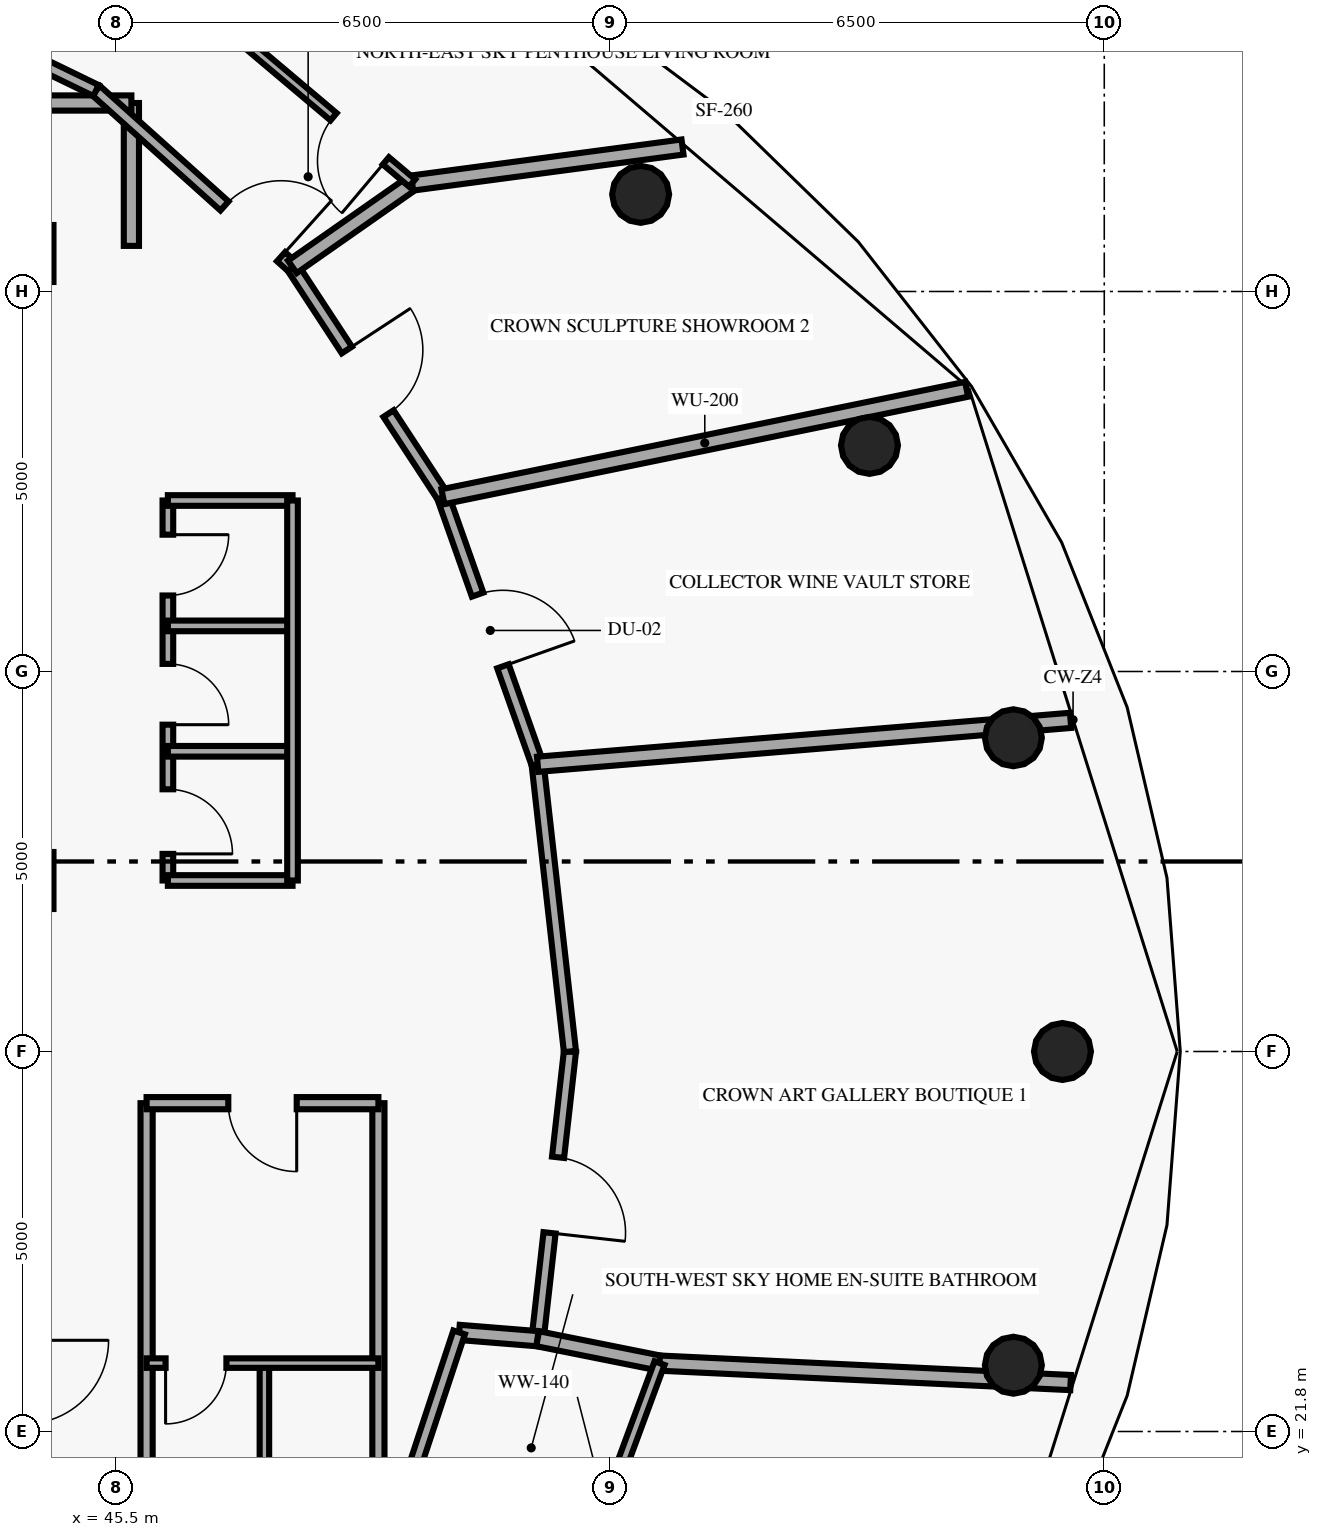
"""IFC4 building model, lengths in metres.
Left out: names, types, materials, properties, quantities, classifications, styles, units other than length and angle.
Written with IfcOpenShell. Run it as: python <this file> out.ifc"""

import sys

from ifc_helpers import new_model, si_unit, direction, frame, frame_2d, origin, origin_2d, place, context, subcontext, project, spatial, rectangle, circle, extrude, element, fill, save


model = new_model("IFC4")
c1 = context("Model", 3, precision=1e-05, world=origin(), true_north=direction((0.0, 1.0)))
c2 = subcontext(c1, "Body", "Model", "MODEL_VIEW")
j1 = project(units=[si_unit("LENGTHUNIT", "METRE"), si_unit("PLANEANGLEUNIT", "RADIAN")], contexts=[c1])
p1 = place(None, origin())
s1 = spatial("IfcSite", under=j1, at=p1, CompositionType="ELEMENT")
p2 = place(p1, origin())
s2 = spatial("IfcBuilding", under=s1, at=p2, CompositionType="ELEMENT")
p3 = place(p2, frame((0.0, 0.0, 255.6)))
s3 = spatial("IfcBuildingStorey", under=s2, at=p3, CompositionType="ELEMENT", Elevation=255.6)
for number, where, z_axis, x_axis in (
    (1, (44.3, 29.05, 0.0), (0.0, 0.0, 1.0), (1.0, 0.0, 0.0)),
    (2, (44.3, 37.3, 0.0), (0.0, 0.0, 1.0), (1.0, 0.0, 0.0)),
):
    element("IfcColumn", number, at=place(p3, frame(where, z_axis=z_axis, x_axis=x_axis)), inside=s3, PredefinedType="PILASTER", context=c2, shape_type="SweptSolid", body=[
        extrude(rectangle(XDim=0.75, YDim=0.75, at=origin_2d()), origin(), (0.0, 0.0, 1.0), 3.54),
    ])
for number, where, z_axis, x_axis in (
    (3, (57.95, 26.8, 0.0), (0.0, 0.0, 1.0), (1.0, 0.0, 0.0)),
    (4, (57.304, 30.928, 0.0), (0.0, 0.0, 1.0), (1.0, 0.0, 0.0)),
    (5, (55.411, 34.775, 0.0), (0.0, 0.0, 1.0), (1.0, 0.0, 0.0)),
    (6, (52.4, 38.078, 0.0), (0.0, 0.0, 1.0), (1.0, 0.0, 0.0)),
    (7, (57.304, 22.672, 0.0), (0.0, 0.0, 1.0), (1.0, 0.0, 0.0)),
):
    element("IfcColumn", number, at=place(p3, frame(where, z_axis=z_axis, x_axis=x_axis)), inside=s3, PredefinedType="COLUMN", context=c2, shape_type="SweptSolid", body=[
        extrude(circle(Radius=0.375, at=origin_2d()), origin(), (0.0, 0.0, 1.0), 3.54),
    ])
p4 = place(p3, frame((45.7, 37.4, 0.0), z_axis=(0.0, 0.0, 1.0), x_axis=(0.0, 1.0, 0.0)))
e8 = element("IfcWall", 8, at=p4, inside=s3, PredefinedType="SOLIDWALL", context=c2, shape_type="SweptSolid", body=[
    extrude(rectangle(XDim=1.88, YDim=0.2, at=frame_2d((0.94, 0.0))), origin(), (0.0, 0.0, 1.0), 3.54),
])
p5 = place(p3, frame((45.7, 39.28, 0.0), z_axis=(0.0, 0.0, 1.0), x_axis=(-1.0, 0.0, 0.0)))
e9 = element("IfcWall", 9, at=p5, inside=s3, PredefinedType="SOLIDWALL", context=c2, shape_type="SweptSolid", body=[
    extrude(rectangle(XDim=6.6, YDim=0.2, at=frame_2d((3.3, 0.0))), origin(), (0.0, 0.0, 1.0), 3.54),
])
p6 = place(p5, frame((4.35, 0.0, 0.0)))
e10 = element("IfcOpeningElement", 10, at=p6, cuts=e9, PredefinedType="OPENING", context=c2, shape_type="SweptSolid", body=[
    extrude(rectangle(XDim=1.6, YDim=2.2, at=frame_2d((0.8, 1.1))), frame((0.0, 0.11, 0.0), z_axis=(0.0, -1.0, 0.0), x_axis=(1.0, 0.0, 0.0)), (0.0, 0.0, 1.0), 0.22),
])
for number, where, z_axis, x_axis in (
    (11, (48.95, 19.05, 0.0), (0.0, 0.0, 1.0), (0.0, 1.0, 0.0)),
    (12, (45.9, 19.05, 0.0), (0.0, 0.0, 1.0), (0.0, 1.0, 0.0)),
):
    element("IfcWall", number, at=place(p3, frame(where, z_axis=z_axis, x_axis=x_axis)), inside=s3, PredefinedType="PARTITIONING", context=c2, shape_type="SweptSolid", body=[
        extrude(rectangle(XDim=7.07, YDim=0.16, at=frame_2d((3.535, 0.0))), origin(), (0.0, 0.0, 1.0), 3.54),
    ])
p7 = place(p3, frame((47.45, 22.7, 0.0), z_axis=(0.0, 0.0, 1.0), x_axis=(0.0, -1.0, 0.0)))
e13 = element("IfcWall", 13, at=p7, inside=s3, PredefinedType="PARTITIONING", context=c2, shape_type="SweptSolid", body=[
    extrude(rectangle(XDim=3.65, YDim=0.125, at=frame_2d((1.825, 0.0))), origin(), (0.0, 0.0, 1.0), 3.54),
])
p8 = place(p7, frame((1.425, 0.0, 0.0)))
e14 = element("IfcOpeningElement", 14, at=p8, cuts=e13, PredefinedType="OPENING", context=c2, shape_type="SweptSolid", body=[
    extrude(rectangle(XDim=0.8, YDim=2.05, at=frame_2d((0.4, 1.025))), frame((0.0, 0.073, 0.0), z_axis=(0.0, -1.0, 0.0), x_axis=(1.0, 0.0, 0.0)), (0.0, 0.0, 1.0), 0.145),
])
p9 = place(p3, frame((48.95, 22.7, 0.0), z_axis=(0.0, 0.0, 1.0), x_axis=(-1.0, 0.0, 0.0)))
e15 = element("IfcWall", 15, at=p9, inside=s3, PredefinedType="PARTITIONING", context=c2, shape_type="SweptSolid", body=[
    extrude(rectangle(XDim=3.05, YDim=0.125, at=frame_2d((1.525, 0.0))), origin(), (0.0, 0.0, 1.0), 3.54),
])
p10 = place(p9, frame((2.0, 0.0, 0.0)))
e16 = element("IfcOpeningElement", 16, at=p10, cuts=e15, PredefinedType="OPENING", context=c2, shape_type="SweptSolid", body=[
    extrude(rectangle(XDim=0.8, YDim=2.05, at=frame_2d((0.4, 1.025))), frame((0.0, 0.073, 0.0), z_axis=(0.0, -1.0, 0.0), x_axis=(1.0, 0.0, 0.0)), (0.0, 0.0, 1.0), 0.145),
])
p11 = place(p3, frame((48.95, 26.12, 0.0), z_axis=(0.0, 0.0, 1.0), x_axis=(-1.0, 0.0, 0.0)))
e17 = element("IfcWall", 17, at=p11, inside=s3, PredefinedType="PARTITIONING", context=c2, shape_type="SweptSolid", body=[
    extrude(rectangle(XDim=3.05, YDim=0.16, at=frame_2d((1.525, 0.0))), origin(), (0.0, 0.0, 1.0), 3.54),
])
p12 = place(p11, frame((1.075, 0.0, 0.0)))
e18 = element("IfcOpeningElement", 18, at=p12, cuts=e17, PredefinedType="OPENING", context=c2, shape_type="SweptSolid", body=[
    extrude(rectangle(XDim=0.9, YDim=2.1, at=frame_2d((0.45, 1.05))), frame((0.0, 0.09, 0.0), z_axis=(0.0, -1.0, 0.0), x_axis=(1.0, 0.0, 0.0)), (0.0, 0.0, 1.0), 0.18),
])
p13 = place(p3, frame((46.18, 34.05, 0.0), z_axis=(0.0, 0.0, 1.0), x_axis=(0.0, -1.0, 0.0)))
e19 = element("IfcWall", 19, at=p13, inside=s3, PredefinedType="PARTITIONING", context=c2, shape_type="SweptSolid", body=[
    extrude(rectangle(XDim=5.0, YDim=0.14, at=frame_2d((2.5, 0.0))), origin(), (0.0, 0.0, 1.0), 3.54),
])
p14 = place(p13, frame((3.8, 0.0, 0.0)))
e20 = element("IfcOpeningElement", 20, at=p14, cuts=e19, PredefinedType="OPENING", context=c2, shape_type="SweptSolid", body=[
    extrude(rectangle(XDim=0.85, YDim=2.1, at=frame_2d((0.425, 1.05))), frame((0.0, 0.08, 0.0), z_axis=(0.0, -1.0, 0.0), x_axis=(1.0, 0.0, 0.0)), (0.0, 0.0, 1.0), 0.16),
])
p15 = place(p13, frame((2.15, 0.0, 0.0)))
e21 = element("IfcOpeningElement", 21, at=p15, cuts=e19, PredefinedType="OPENING", context=c2, shape_type="SweptSolid", body=[
    extrude(rectangle(XDim=0.8, YDim=2.05, at=frame_2d((0.4, 1.025))), frame((0.0, 0.08, 0.0), z_axis=(0.0, -1.0, 0.0), x_axis=(1.0, 0.0, 0.0)), (0.0, 0.0, 1.0), 0.16),
])
p16 = place(p13, frame((0.45, 0.0, 0.0)))
e22 = element("IfcOpeningElement", 22, at=p16, cuts=e19, PredefinedType="OPENING", context=c2, shape_type="SweptSolid", body=[
    extrude(rectangle(XDim=0.8, YDim=2.05, at=frame_2d((0.4, 1.025))), frame((0.0, 0.08, 0.0), z_axis=(0.0, -1.0, 0.0), x_axis=(1.0, 0.0, 0.0)), (0.0, 0.0, 1.0), 0.16),
])
for number, where, z_axis, x_axis in (
    (23, (46.18, 29.05, 0.0), (0.0, 0.0, 1.0), (1.0, 0.0, 0.0)),
    (24, (46.18, 30.75, 0.0), (0.0, 0.0, 1.0), (1.0, 0.0, 0.0)),
    (25, (46.18, 32.4, 0.0), (0.0, 0.0, 1.0), (1.0, 0.0, 0.0)),
    (26, (46.18, 34.05, 0.0), (0.0, 0.0, 1.0), (1.0, 0.0, 0.0)),
):
    element("IfcWall", number, at=place(p3, frame(where, z_axis=z_axis, x_axis=x_axis)), inside=s3, PredefinedType="PARTITIONING", context=c2, shape_type="SweptSolid", body=[
        extrude(rectangle(XDim=1.64, YDim=0.14, at=frame_2d((0.82, 0.0))), origin(), (0.0, 0.0, 1.0), 3.54),
    ])
p17 = place(p3, frame((47.82, 29.05, 0.0), z_axis=(0.0, 0.0, 1.0), x_axis=(0.0, 1.0, 0.0)))
e27 = element("IfcWall", 27, at=p17, inside=s3, PredefinedType="PARTITIONING", context=c2, shape_type="SweptSolid", body=[
    extrude(rectangle(XDim=5.0, YDim=0.14, at=frame_2d((2.5, 0.0))), origin(), (0.0, 0.0, 1.0), 3.54),
])
p18 = place(p3, frame((51.47, 26.8, 0.0), z_axis=(0.0, 0.0, 1.0), x_axis=(-0.111770206893, -0.993734079546, 0.0)))
e28 = element("IfcWall", 28, at=p18, inside=s3, PredefinedType="PARTITIONING", context=c2, shape_type="SweptSolid", body=[
    extrude(rectangle(XDim=3.803, YDim=0.16, at=frame_2d((1.901, 0.0))), origin(), (0.0, 0.0, 1.0), 3.54),
])
p19 = place(p18, frame((1.401, 0.0, 0.0)))
e29 = element("IfcOpeningElement", 29, at=p19, cuts=e28, PredefinedType="OPENING", context=c2, shape_type="SweptSolid", body=[
    extrude(rectangle(XDim=1.0, YDim=2.15, at=frame_2d((0.5, 1.075))), frame((0.0, 0.09, 0.0), z_axis=(0.0, -1.0, 0.0), x_axis=(1.0, 0.0, 0.0)), (0.0, 0.0, 1.0), 0.18),
])
p20 = place(p3, frame((51.47, 26.8, 0.0), z_axis=(0.0, 0.0, 1.0), x_axis=(-0.111770206893, 0.993734079546, 0.0)))
e30 = element("IfcWall", 30, at=p20, inside=s3, PredefinedType="PARTITIONING", context=c2, shape_type="SweptSolid", body=[
    extrude(rectangle(XDim=3.803, YDim=0.16, at=frame_2d((1.901, 0.0))), origin(), (0.0, 0.0, 1.0), 3.54),
])
p21 = place(p3, frame((49.799, 34.1, 0.0), z_axis=(0.0, 0.0, 1.0), x_axis=(0.333568819216, -0.942725751662, 0.0)))
e31 = element("IfcWall", 31, at=p21, inside=s3, PredefinedType="PARTITIONING", context=c2, shape_type="SweptSolid", body=[
    extrude(rectangle(XDim=3.735, YDim=0.16, at=frame_2d((1.867, 0.0))), origin(), (0.0, 0.0, 1.0), 3.54),
])
p22 = place(p21, frame((1.367, 0.0, 0.0)))
e32 = element("IfcOpeningElement", 32, at=p22, cuts=e31, PredefinedType="OPENING", context=c2, shape_type="SweptSolid", body=[
    extrude(rectangle(XDim=1.0, YDim=2.15, at=frame_2d((0.5, 1.075))), frame((0.0, 0.09, 0.0), z_axis=(0.0, -1.0, 0.0), x_axis=(1.0, 0.0, 0.0)), (0.0, 0.0, 1.0), 0.18),
])
p23 = place(p3, frame((47.818, 37.124, 0.0), z_axis=(0.0, 0.0, 1.0), x_axis=(0.547980633713, -0.836491019124, 0.0)))
e33 = element("IfcWall", 33, at=p23, inside=s3, PredefinedType="PARTITIONING", context=c2, shape_type="SweptSolid", body=[
    extrude(rectangle(XDim=3.615, YDim=0.16, at=frame_2d((1.808, 0.0))), origin(), (0.0, 0.0, 1.0), 3.54),
])
p24 = place(p23, frame((1.308, 0.0, 0.0)))
e34 = element("IfcOpeningElement", 34, at=p24, cuts=e33, PredefinedType="OPENING", context=c2, shape_type="SweptSolid", body=[
    extrude(rectangle(XDim=1.0, YDim=2.15, at=frame_2d((0.5, 1.075))), frame((0.0, 0.09, 0.0), z_axis=(0.0, -1.0, 0.0), x_axis=(1.0, 0.0, 0.0)), (0.0, 0.0, 1.0), 0.18),
])
p25 = place(p3, frame((45.235, 39.444, 0.0), z_axis=(0.0, 0.0, 1.0), x_axis=(0.743958104357, -0.668226263299, 0.0)))
e35 = element("IfcWall", 35, at=p25, inside=s3, PredefinedType="PARTITIONING", context=c2, shape_type="SweptSolid", body=[
    extrude(rectangle(XDim=3.472, YDim=0.16, at=frame_2d((1.736, 0.0))), origin(), (0.0, 0.0, 1.0), 3.54),
])
p26 = place(p25, frame((2.272, 0.0, 0.0)))
e36 = element("IfcOpeningElement", 36, at=p26, cuts=e35, PredefinedType="OPENING", context=c2, shape_type="SweptSolid", body=[
    extrude(rectangle(XDim=1.0, YDim=2.15, at=frame_2d((0.5, 1.075))), frame((0.0, 0.09, 0.0), z_axis=(0.0, -1.0, 0.0), x_axis=(1.0, 0.0, 0.0)), (0.0, 0.0, 1.0), 0.18),
])
p27 = place(p3, frame((45.235, 39.444, 0.0), z_axis=(0.0, 0.0, 1.0), x_axis=(-0.899751550897, 0.436402505329, 0.0)))
e37 = element("IfcWall", 37, at=p27, inside=s3, PredefinedType="PARTITIONING", context=c2, shape_type="SweptSolid", body=[
    extrude(rectangle(XDim=3.343, YDim=0.16, at=frame_2d((1.672, 0.0))), origin(), (0.0, 0.0, 1.0), 3.54),
])
p28 = place(p3, frame((50.012, 23.104, 0.0), z_axis=(0.0, 0.0, 1.0), x_axis=(0.996786749309, -0.080101038706, 0.0)))
e38 = element("IfcWall", 38, at=p28, inside=s3, PredefinedType="PARTITIONING", context=c2, shape_type="SweptSolid", body=[
    extrude(rectangle(XDim=1.036, YDim=0.2, at=frame_2d((0.518, 0.0))), origin(), (0.0, 0.0, 1.0), 3.54),
])
p29 = place(p3, frame((51.045, 23.021, 0.0), z_axis=(0.0, 0.0, 1.0), x_axis=(0.980551963868, -0.196259639648, 0.0)))
e39 = element("IfcWall", 39, at=p29, inside=s3, PredefinedType="PARTITIONING", context=c2, shape_type="SweptSolid", body=[
    extrude(rectangle(XDim=1.636, YDim=0.2, at=frame_2d((0.818, 0.0))), origin(), (0.0, 0.0, 1.0), 3.54),
])
p30 = place(p3, frame((52.649, 22.7, 0.0), z_axis=(0.0, 0.0, 1.0), x_axis=(0.998882680054, -0.047258771554, 0.0)))
e40 = element("IfcWall", 40, at=p30, inside=s3, PredefinedType="PARTITIONING", context=c2, shape_type="SweptSolid", body=[
    extrude(rectangle(XDim=5.414, YDim=0.2, at=frame_2d((2.707, 0.0))), origin(), (0.0, 0.0, 1.0), 3.54),
])
p31 = place(p3, frame((51.045, 30.579, 0.0), z_axis=(0.0, 0.0, 1.0), x_axis=(0.996622662383, 0.082117408774, 0.0)))
e41 = element("IfcWall", 41, at=p31, inside=s3, PredefinedType="PARTITIONING", context=c2, shape_type="SweptSolid", body=[
    extrude(rectangle(XDim=6.27, YDim=0.2, at=frame_2d((3.135, 0.0))), origin(), (0.0, 0.0, 1.0), 3.54),
])
p32 = place(p3, frame((57.294, 31.094, 0.0), z_axis=(0.0, 0.0, 1.0), x_axis=(0.996609247306, 0.082280059458, 0.0)))
e42 = element("IfcWall", 42, at=p32, inside=s3, PredefinedType="PARTITIONING", context=c2, shape_type="SweptSolid", body=[
    extrude(rectangle(XDim=0.766, YDim=0.2, at=frame_2d((0.383, 0.0))), origin(), (0.0, 0.0, 1.0), 2.925),
])
p33 = place(p3, frame((49.799, 34.1, 0.0), z_axis=(0.0, 0.0, 1.0), x_axis=(0.97961583885, 0.200880084314, 0.0)))
e43 = element("IfcWall", 43, at=p33, inside=s3, PredefinedType="PARTITIONING", context=c2, shape_type="SweptSolid", body=[
    extrude(rectangle(XDim=7.033, YDim=0.2, at=frame_2d((3.517, 0.0))), origin(), (0.0, 0.0, 1.0), 3.54),
])
p34 = place(p3, frame((47.818, 37.124, 0.0), z_axis=(0.0, 0.0, 1.0), x_axis=(0.819261732585, 0.573419753341, 0.0)))
e44 = element("IfcWall", 44, at=p34, inside=s3, PredefinedType="PARTITIONING", context=c2, shape_type="SweptSolid", body=[
    extrude(rectangle(XDim=1.924, YDim=0.2, at=frame_2d((0.962, 0.0))), origin(), (0.0, 0.0, 1.0), 3.54),
])
p35 = place(p3, frame((49.394, 38.227, 0.0), z_axis=(0.0, 0.0, 1.0), x_axis=(0.991241562349, 0.13206121714, 0.0)))
e45 = element("IfcWall", 45, at=p35, inside=s3, PredefinedType="PARTITIONING", context=c2, shape_type="SweptSolid", body=[
    extrude(rectangle(XDim=3.588, YDim=0.2, at=frame_2d((1.794, 0.0))), origin(), (0.0, 0.0, 1.0), 3.54),
])
p36 = place(p3, frame((46.35, 40.795, 0.0), z_axis=(0.0, 0.0, 1.0), x_axis=(0.764348134159, -0.644803791713, 0.0)))
e46 = element("IfcWall", 46, at=p36, inside=s3, PredefinedType="PARTITIONING", context=c2, shape_type="SweptSolid", body=[
    extrude(rectangle(XDim=3.982, YDim=0.125, at=frame_2d((1.991, 0.0))), origin(), (0.0, 0.0, 1.0), 3.54),
])
p37 = place(p36, frame((2.63, 0.0, 0.0)))
e47 = element("IfcOpeningElement", 47, at=p37, cuts=e46, PredefinedType="OPENING", context=c2, shape_type="SweptSolid", body=[
    extrude(rectangle(XDim=0.9, YDim=2.1, at=frame_2d((0.45, 1.05))), frame((0.0, 0.073, 0.0), z_axis=(0.0, -1.0, 0.0), x_axis=(1.0, 0.0, 0.0)), (0.0, 0.0, 1.0), 0.145),
])
p38 = place(p3, frame((48.873, 19.66, 0.0), z_axis=(0.0, 0.0, 1.0), x_axis=(0.313965508334, 0.949434389295, 0.0)))
e48 = element("IfcWall", 48, at=p38, inside=s3, PredefinedType="PARTITIONING", context=c2, shape_type="SweptSolid", body=[
    extrude(rectangle(XDim=3.627, YDim=0.16, at=frame_2d((1.814, 0.0))), origin(), (0.0, 0.0, 1.0), 3.54),
])
p39 = place(p3, frame((52.649, 22.7, 0.0), z_axis=(0.0, 0.0, 1.0), x_axis=(-0.346671925992, -0.937986447519, 0.0)))
e49 = element("IfcWall", 49, at=p39, inside=s3, PredefinedType="PARTITIONING", context=c2, shape_type="SweptSolid", body=[
    extrude(rectangle(XDim=4.073, YDim=0.14, at=frame_2d((2.036, 0.0))), origin(), (0.0, 0.0, 1.0), 3.54),
])
p40 = place(p39, frame((1.611, 0.0, 0.0)))
e50 = element("IfcOpeningElement", 50, at=p40, cuts=e49, PredefinedType="OPENING", context=c2, shape_type="SweptSolid", body=[
    extrude(rectangle(XDim=0.85, YDim=2.1, at=frame_2d((0.425, 1.05))), frame((0.0, 0.08, 0.0), z_axis=(0.0, -1.0, 0.0), x_axis=(1.0, 0.0, 0.0)), (0.0, 0.0, 1.0), 0.16),
])
p41 = place(p10, origin())
e51 = element("IfcDoor", 51, at=p41, inside=s3, OperationType="SINGLE_SWING_RIGHT", PredefinedType="DOOR", context=c2, shape_type="SweptSolid", body=[
    extrude(rectangle(XDim=0.8, YDim=2.05, at=frame_2d((0.4, 1.025))), frame((0.0, 0.025, 0.0), z_axis=(0.0, -1.0, 0.0), x_axis=(1.0, 0.0, 0.0)), (0.0, 0.0, 1.0), 0.05),
])
fill(e16, e51)
p42 = place(p12, origin())
e52 = element("IfcDoor", 52, at=p42, inside=s3, OperationType="SINGLE_SWING_LEFT", PredefinedType="DOOR", context=c2, shape_type="SweptSolid", body=[
    extrude(rectangle(XDim=0.9, YDim=2.1, at=frame_2d((0.45, 1.05))), frame((0.0, 0.025, 0.0), z_axis=(0.0, -1.0, 0.0), x_axis=(1.0, 0.0, 0.0)), (0.0, 0.0, 1.0), 0.05),
])
fill(e18, e52)
p43 = place(p14, origin())
e53 = element("IfcDoor", 53, at=p43, inside=s3, OperationType="SINGLE_SWING_RIGHT", PredefinedType="DOOR", context=c2, shape_type="SweptSolid", body=[
    extrude(rectangle(XDim=0.85, YDim=2.1, at=frame_2d((0.425, 1.05))), frame((0.0, 0.025, 0.0), z_axis=(0.0, -1.0, 0.0), x_axis=(1.0, 0.0, 0.0)), (0.0, 0.0, 1.0), 0.05),
])
fill(e20, e53)
p44 = place(p15, origin())
e54 = element("IfcDoor", 54, at=p44, inside=s3, OperationType="SINGLE_SWING_RIGHT", PredefinedType="DOOR", context=c2, shape_type="SweptSolid", body=[
    extrude(rectangle(XDim=0.8, YDim=2.05, at=frame_2d((0.4, 1.025))), frame((0.0, 0.025, 0.0), z_axis=(0.0, -1.0, 0.0), x_axis=(1.0, 0.0, 0.0)), (0.0, 0.0, 1.0), 0.05),
])
fill(e21, e54)
p45 = place(p16, origin())
e55 = element("IfcDoor", 55, at=p45, inside=s3, OperationType="SINGLE_SWING_LEFT", PredefinedType="DOOR", context=c2, shape_type="SweptSolid", body=[
    extrude(rectangle(XDim=0.8, YDim=2.05, at=frame_2d((0.4, 1.025))), frame((0.0, 0.025, 0.0), z_axis=(0.0, -1.0, 0.0), x_axis=(1.0, 0.0, 0.0)), (0.0, 0.0, 1.0), 0.05),
])
fill(e22, e55)
p46 = place(p19, origin())
e56 = element("IfcDoor", 56, at=p46, inside=s3, OperationType="SINGLE_SWING_RIGHT", PredefinedType="DOOR", context=c2, shape_type="SweptSolid", body=[
    extrude(rectangle(XDim=1.0, YDim=2.15, at=frame_2d((0.5, 1.075))), frame((0.0, 0.025, 0.0), z_axis=(0.0, -1.0, 0.0), x_axis=(1.0, 0.0, 0.0)), (0.0, 0.0, 1.0), 0.05),
])
fill(e29, e56)
p47 = place(p22, origin())
e57 = element("IfcDoor", 57, at=p47, inside=s3, OperationType="SINGLE_SWING_RIGHT", PredefinedType="DOOR", context=c2, shape_type="SweptSolid", body=[
    extrude(rectangle(XDim=1.0, YDim=2.15, at=frame_2d((0.5, 1.075))), frame((0.0, 0.025, 0.0), z_axis=(0.0, -1.0, 0.0), x_axis=(1.0, 0.0, 0.0)), (0.0, 0.0, 1.0), 0.05),
])
fill(e32, e57)
p48 = place(p24, origin())
e58 = element("IfcDoor", 58, at=p48, inside=s3, OperationType="SINGLE_SWING_LEFT", PredefinedType="DOOR", context=c2, shape_type="SweptSolid", body=[
    extrude(rectangle(XDim=1.0, YDim=2.15, at=frame_2d((0.5, 1.075))), frame((0.0, 0.025, 0.0), z_axis=(0.0, -1.0, 0.0), x_axis=(1.0, 0.0, 0.0)), (0.0, 0.0, 1.0), 0.05),
])
fill(e34, e58)
p49 = place(p26, origin())
e59 = element("IfcDoor", 59, at=p49, inside=s3, OperationType="SINGLE_SWING_RIGHT", PredefinedType="DOOR", context=c2, shape_type="SweptSolid", body=[
    extrude(rectangle(XDim=1.0, YDim=2.15, at=frame_2d((0.5, 1.075))), frame((0.0, 0.025, 0.0), z_axis=(0.0, -1.0, 0.0), x_axis=(1.0, 0.0, 0.0)), (0.0, 0.0, 1.0), 0.05),
])
fill(e36, e59)
p50 = place(p37, origin())
e60 = element("IfcDoor", 60, at=p50, inside=s3, OperationType="SINGLE_SWING_RIGHT", PredefinedType="DOOR", context=c2, shape_type="SweptSolid", body=[
    extrude(rectangle(XDim=0.9, YDim=2.1, at=frame_2d((0.45, 1.05))), frame((0.0, 0.025, 0.0), z_axis=(0.0, -1.0, 0.0), x_axis=(1.0, 0.0, 0.0)), (0.0, 0.0, 1.0), 0.05),
])
fill(e47, e60)
save(model, sys.argv[1])
